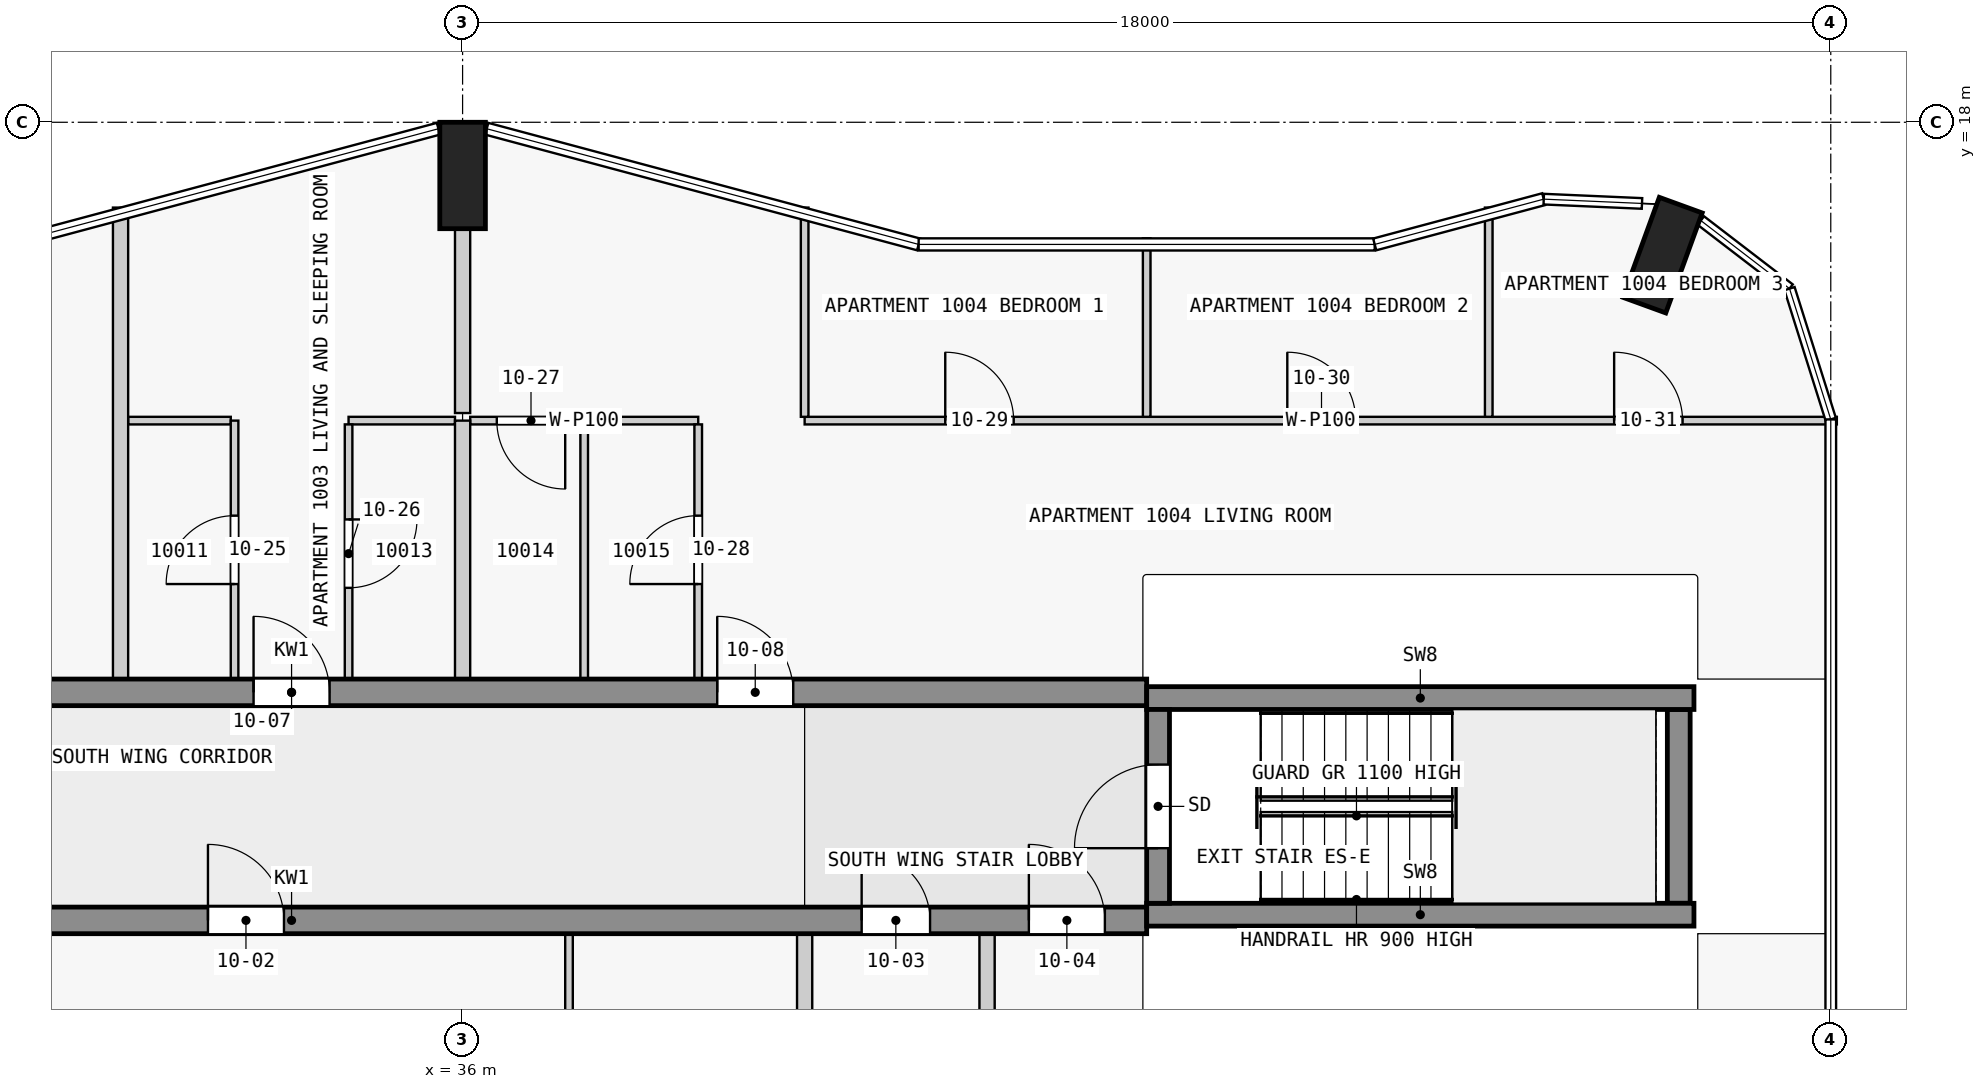
"""IFC4 building model, lengths in metres.
Left out: names, types, materials, properties, quantities, classifications, styles, units other than length and angle.
Written with IfcOpenShell. Run it as: python <this file> out.ifc"""

import sys

from ifc_helpers import new_model, si_unit, direction, frame, frame_2d, origin, origin_2d, place, context, subcontext, project, spatial, rectangle, extrude, element, fill, save


model = new_model("IFC4")
c1 = context("Model", 3, precision=1e-05, world=origin(), true_north=direction((0.0, 1.0)))
c2 = subcontext(c1, "Body", "Model", "MODEL_VIEW")
j1 = project(units=[si_unit("LENGTHUNIT", "METRE"), si_unit("PLANEANGLEUNIT", "RADIAN")], contexts=[c1])
p1 = place(None, origin())
s1 = spatial("IfcSite", under=j1, at=p1, CompositionType="ELEMENT")
p2 = place(p1, origin())
s2 = spatial("IfcBuilding", under=s1, at=p2, CompositionType="ELEMENT")
p3 = place(p2, frame((0.0, 0.0, 44.3)))
s3 = spatial("IfcBuildingStorey", under=s2, at=p3, CompositionType="ELEMENT", Elevation=44.3)
for number, where, z_axis, x_axis in (
    (1, (51.787, 16.252, 0.0), (0.0, 0.0, 1.0), (-0.94, 0.342, 0.0)),
    (2, (36.0, 17.3, 0.0), (0.0, 0.0, 1.0), (1.0, 0.0, 0.0)),
):
    element("IfcColumn", number, at=place(p3, frame(where, z_axis=z_axis, x_axis=x_axis)), inside=s3, PredefinedType="COLUMN", context=c2, shape_type="SweptSolid", body=[
        extrude(rectangle(XDim=0.6, YDim=1.4, at=origin_2d()), origin(), (0.0, 0.0, 1.0), 3.5),
    ])
p4 = place(p3, frame((45.15, 7.725, 0.0), z_axis=(0.0, 0.0, 1.0), x_axis=(0.0, 1.0, 0.0)))
e3 = element("IfcWall", 3, at=p4, inside=s3, PredefinedType="SHEAR", context=c2, shape_type="SweptSolid", body=[
    extrude(rectangle(XDim=2.55, YDim=0.3, at=frame_2d((1.275, 0.0))), origin(), (0.0, 0.0, 1.0), 3.5),
])
p5 = place(p4, frame((0.725, 0.0, 0.0)))
e4 = element("IfcOpeningElement", 4, at=p5, cuts=e3, PredefinedType="OPENING", context=c2, shape_type="SweptSolid", body=[
    extrude(rectangle(XDim=1.1, YDim=2.1, at=frame_2d((0.55, 1.05))), frame((0.0, 0.16, 0.0), z_axis=(0.0, -1.0, 0.0), x_axis=(1.0, 0.0, 0.0)), (0.0, 0.0, 1.0), 0.32),
])
p6 = place(p3, frame((52.0, 7.725, 0.0), z_axis=(0.0, 0.0, 1.0), x_axis=(0.0, 1.0, 0.0)))
e5 = element("IfcWall", 5, at=p6, inside=s3, PredefinedType="SHEAR", context=c2, shape_type="SweptSolid", body=[
    extrude(rectangle(XDim=2.55, YDim=0.3, at=frame_2d((1.275, 0.0))), origin(), (0.0, 0.0, 1.0), 3.5),
])
for number, where, z_axis, x_axis in (
    (6, (45.0, 7.575, 0.0), (0.0, 0.0, 1.0), (1.0, 0.0, 0.0)),
    (7, (45.0, 10.425, 0.0), (0.0, 0.0, 1.0), (1.0, 0.0, 0.0)),
):
    element("IfcWall", number, at=place(p3, frame(where, z_axis=z_axis, x_axis=x_axis)), inside=s3, PredefinedType="SHEAR", context=c2, shape_type="SweptSolid", body=[
        extrude(rectangle(XDim=7.2, YDim=0.3, at=frame_2d((3.6, 0.0))), origin(), (0.0, 0.0, 1.0), 3.5),
    ])
p7 = place(p3, frame((22.5, 7.5, 0.0), z_axis=(0.0, 0.0, 1.0), x_axis=(1.0, 0.0, 0.0)))
e8 = element("IfcWall", 8, at=p7, inside=s3, PredefinedType="SHEAR", context=c2, shape_type="SweptSolid", body=[
    extrude(rectangle(XDim=22.5, YDim=0.35, at=frame_2d((11.25, 0.0))), origin(), (0.0, 0.0, 1.0), 3.25),
])
p8 = place(p7, frame((1.75, 0.0, 0.0)))
e9 = element("IfcOpeningElement", 9, at=p8, cuts=e8, PredefinedType="OPENING", context=c2, shape_type="SweptSolid", body=[
    extrude(rectangle(XDim=1.0, YDim=2.1, at=frame_2d((0.5, 1.05))), frame((0.0, 0.185, 0.0), z_axis=(0.0, -1.0, 0.0), x_axis=(1.0, 0.0, 0.0)), (0.0, 0.0, 1.0), 0.37),
])
p9 = place(p7, frame((10.15, 0.0, 0.0)))
e10 = element("IfcOpeningElement", 10, at=p9, cuts=e8, PredefinedType="OPENING", context=c2, shape_type="SweptSolid", body=[
    extrude(rectangle(XDim=1.0, YDim=2.1, at=frame_2d((0.5, 1.05))), frame((0.0, 0.185, 0.0), z_axis=(0.0, -1.0, 0.0), x_axis=(1.0, 0.0, 0.0)), (0.0, 0.0, 1.0), 0.37),
])
p10 = place(p7, frame((18.75, 0.0, 0.0)))
e11 = element("IfcOpeningElement", 11, at=p10, cuts=e8, PredefinedType="OPENING", context=c2, shape_type="SweptSolid", body=[
    extrude(rectangle(XDim=0.9, YDim=2.1, at=frame_2d((0.45, 1.05))), frame((0.0, 0.185, 0.0), z_axis=(0.0, -1.0, 0.0), x_axis=(1.0, 0.0, 0.0)), (0.0, 0.0, 1.0), 0.37),
])
p11 = place(p7, frame((20.95, 0.0, 0.0)))
e12 = element("IfcOpeningElement", 12, at=p11, cuts=e8, PredefinedType="OPENING", context=c2, shape_type="SweptSolid", body=[
    extrude(rectangle(XDim=1.0, YDim=2.1, at=frame_2d((0.5, 1.05))), frame((0.0, 0.185, 0.0), z_axis=(0.0, -1.0, 0.0), x_axis=(1.0, 0.0, 0.0)), (0.0, 0.0, 1.0), 0.37),
])
p12 = place(p3, frame((22.5, 10.5, 0.0), z_axis=(0.0, 0.0, 1.0), x_axis=(1.0, 0.0, 0.0)))
e13 = element("IfcWall", 13, at=p12, inside=s3, PredefinedType="SHEAR", context=c2, shape_type="SweptSolid", body=[
    extrude(rectangle(XDim=22.5, YDim=0.35, at=frame_2d((11.25, 0.0))), origin(), (0.0, 0.0, 1.0), 3.25),
])
p13 = place(p12, frame((1.75, 0.0, 0.0)))
e14 = element("IfcOpeningElement", 14, at=p13, cuts=e13, PredefinedType="OPENING", context=c2, shape_type="SweptSolid", body=[
    extrude(rectangle(XDim=1.0, YDim=2.1, at=frame_2d((0.5, 1.05))), frame((0.0, 0.185, 0.0), z_axis=(0.0, -1.0, 0.0), x_axis=(1.0, 0.0, 0.0)), (0.0, 0.0, 1.0), 0.37),
])
p14 = place(p12, frame((6.25, 0.0, 0.0)))
e15 = element("IfcOpeningElement", 15, at=p14, cuts=e13, PredefinedType="OPENING", context=c2, shape_type="SweptSolid", body=[
    extrude(rectangle(XDim=1.0, YDim=2.1, at=frame_2d((0.5, 1.05))), frame((0.0, 0.185, 0.0), z_axis=(0.0, -1.0, 0.0), x_axis=(1.0, 0.0, 0.0)), (0.0, 0.0, 1.0), 0.37),
])
p15 = place(p12, frame((10.75, 0.0, 0.0)))
e16 = element("IfcOpeningElement", 16, at=p15, cuts=e13, PredefinedType="OPENING", context=c2, shape_type="SweptSolid", body=[
    extrude(rectangle(XDim=1.0, YDim=2.1, at=frame_2d((0.5, 1.05))), frame((0.0, 0.185, 0.0), z_axis=(0.0, -1.0, 0.0), x_axis=(1.0, 0.0, 0.0)), (0.0, 0.0, 1.0), 0.37),
])
p16 = place(p12, frame((16.85, 0.0, 0.0)))
e17 = element("IfcOpeningElement", 17, at=p16, cuts=e13, PredefinedType="OPENING", context=c2, shape_type="SweptSolid", body=[
    extrude(rectangle(XDim=1.0, YDim=2.1, at=frame_2d((0.5, 1.05))), frame((0.0, 0.185, 0.0), z_axis=(0.0, -1.0, 0.0), x_axis=(1.0, 0.0, 0.0)), (0.0, 0.0, 1.0), 0.37),
])
p17 = place(p3, frame((32.95, 14.075, 0.0), z_axis=(0.0, 0.0, 1.0), x_axis=(-1.0, 0.0, 0.0)))
e18 = element("IfcWall", 18, at=p17, inside=s3, PredefinedType="PARTITIONING", context=c2, shape_type="SweptSolid", body=[
    extrude(rectangle(XDim=1.35, YDim=0.1, at=frame_2d((0.675, 0.0))), origin(), (0.0, 0.0, 1.0), 3.25),
])
p18 = place(p3, frame((35.9, 14.075, 0.0), z_axis=(0.0, 0.0, 1.0), x_axis=(-1.0, 0.0, 0.0)))
e19 = element("IfcWall", 19, at=p18, inside=s3, PredefinedType="PARTITIONING", context=c2, shape_type="SweptSolid", body=[
    extrude(rectangle(XDim=1.4, YDim=0.1, at=frame_2d((0.7, 0.0))), origin(), (0.0, 0.0, 1.0), 3.25),
])
p19 = place(p3, frame((39.1, 14.075, 0.0), z_axis=(0.0, 0.0, 1.0), x_axis=(-1.0, 0.0, 0.0)))
e20 = element("IfcWall", 20, at=p19, inside=s3, PredefinedType="PARTITIONING", context=c2, shape_type="SweptSolid", body=[
    extrude(rectangle(XDim=3.0, YDim=0.1, at=frame_2d((1.5, 0.0))), origin(), (0.0, 0.0, 1.0), 3.25),
])
p20 = place(p19, frame((1.75, 0.0, 0.0)))
e21 = element("IfcOpeningElement", 21, at=p20, cuts=e20, PredefinedType="OPENING", context=c2, shape_type="SweptSolid", body=[
    extrude(rectangle(XDim=0.9, YDim=2.1, at=frame_2d((0.45, 1.05))), frame((0.0, 0.06, 0.0), z_axis=(0.0, -1.0, 0.0), x_axis=(1.0, 0.0, 0.0)), (0.0, 0.0, 1.0), 0.12),
])
p21 = place(p3, frame((40.5, 14.075, 0.0), z_axis=(0.0, 0.0, 1.0), x_axis=(1.0, 0.0, 0.0)))
e22 = element("IfcWall", 22, at=p21, inside=s3, PredefinedType="PARTITIONING", context=c2, shape_type="SweptSolid", body=[
    extrude(rectangle(XDim=13.58, YDim=0.1, at=frame_2d((6.79, 0.0))), origin(), (0.0, 0.0, 1.0), 3.25),
])
p22 = place(p21, frame((1.85, 0.0, 0.0)))
e23 = element("IfcOpeningElement", 23, at=p22, cuts=e22, PredefinedType="OPENING", context=c2, shape_type="SweptSolid", body=[
    extrude(rectangle(XDim=0.9, YDim=2.1, at=frame_2d((0.45, 1.05))), frame((0.0, 0.06, 0.0), z_axis=(0.0, -1.0, 0.0), x_axis=(1.0, 0.0, 0.0)), (0.0, 0.0, 1.0), 0.12),
])
p23 = place(p21, frame((6.35, 0.0, 0.0)))
e24 = element("IfcOpeningElement", 24, at=p23, cuts=e22, PredefinedType="OPENING", context=c2, shape_type="SweptSolid", body=[
    extrude(rectangle(XDim=0.9, YDim=2.1, at=frame_2d((0.45, 1.05))), frame((0.0, 0.06, 0.0), z_axis=(0.0, -1.0, 0.0), x_axis=(1.0, 0.0, 0.0)), (0.0, 0.0, 1.0), 0.12),
])
p24 = place(p21, frame((10.65, 0.0, 0.0)))
e25 = element("IfcOpeningElement", 25, at=p24, cuts=e22, PredefinedType="OPENING", context=c2, shape_type="SweptSolid", body=[
    extrude(rectangle(XDim=0.9, YDim=2.1, at=frame_2d((0.45, 1.05))), frame((0.0, 0.06, 0.0), z_axis=(0.0, -1.0, 0.0), x_axis=(1.0, 0.0, 0.0)), (0.0, 0.0, 1.0), 0.12),
])
p25 = place(p3, frame((31.5, 10.675, 0.0), z_axis=(0.0, 0.0, 1.0), x_axis=(0.0, 1.0, 0.0)))
e26 = element("IfcWall", 26, at=p25, inside=s3, PredefinedType="PARTITIONING", context=c2, shape_type="SweptSolid", body=[
    extrude(rectangle(XDim=6.203, YDim=0.2, at=frame_2d((3.101, 0.0))), origin(), (0.0, 0.0, 1.0), 3.25),
])
p26 = place(p3, frame((33.0, 10.675, 0.0), z_axis=(0.0, 0.0, 1.0), x_axis=(0.0, 1.0, 0.0)))
e27 = element("IfcWall", 27, at=p26, inside=s3, PredefinedType="PARTITIONING", context=c2, shape_type="SweptSolid", body=[
    extrude(rectangle(XDim=3.4, YDim=0.1, at=frame_2d((1.7, 0.0))), origin(), (0.0, 0.0, 1.0), 3.25),
])
p27 = place(p26, frame((1.25, 0.0, 0.0)))
e28 = element("IfcOpeningElement", 28, at=p27, cuts=e27, PredefinedType="OPENING", context=c2, shape_type="SweptSolid", body=[
    extrude(rectangle(XDim=0.9, YDim=2.1, at=frame_2d((0.45, 1.05))), frame((0.0, 0.06, 0.0), z_axis=(0.0, -1.0, 0.0), x_axis=(1.0, 0.0, 0.0)), (0.0, 0.0, 1.0), 0.12),
])
p28 = place(p3, frame((34.5, 14.025, 0.0), z_axis=(0.0, 0.0, 1.0), x_axis=(0.0, -1.0, 0.0)))
e29 = element("IfcWall", 29, at=p28, inside=s3, PredefinedType="PARTITIONING", context=c2, shape_type="SweptSolid", body=[
    extrude(rectangle(XDim=3.35, YDim=0.1, at=frame_2d((1.675, 0.0))), origin(), (0.0, 0.0, 1.0), 3.25),
])
p29 = place(p28, frame((1.25, 0.0, 0.0)))
e30 = element("IfcOpeningElement", 30, at=p29, cuts=e29, PredefinedType="OPENING", context=c2, shape_type="SweptSolid", body=[
    extrude(rectangle(XDim=0.9, YDim=2.1, at=frame_2d((0.45, 1.05))), frame((0.0, 0.06, 0.0), z_axis=(0.0, -1.0, 0.0), x_axis=(1.0, 0.0, 0.0)), (0.0, 0.0, 1.0), 0.12),
])
p30 = place(p3, frame((36.0, 16.6, 0.0), z_axis=(0.0, 0.0, 1.0), x_axis=(0.0, -1.0, 0.0)))
e31 = element("IfcWall", 31, at=p30, inside=s3, PredefinedType="PARTITIONING", context=c2, shape_type="SweptSolid", body=[
    extrude(rectangle(XDim=2.425, YDim=0.2, at=frame_2d((1.212, 0.0))), origin(), (0.0, 0.0, 1.0), 3.25),
])
p31 = place(p3, frame((36.0, 10.675, 0.0), z_axis=(0.0, 0.0, 1.0), x_axis=(0.0, 1.0, 0.0)))
e32 = element("IfcWall", 32, at=p31, inside=s3, PredefinedType="PARTITIONING", context=c2, shape_type="SweptSolid", body=[
    extrude(rectangle(XDim=3.4, YDim=0.2, at=frame_2d((1.7, 0.0))), origin(), (0.0, 0.0, 1.0), 3.25),
])
p32 = place(p3, frame((37.4, 7.325, 0.0), z_axis=(0.0, 0.0, 1.0), x_axis=(0.0, -1.0, 0.0)))
e33 = element("IfcWall", 33, at=p32, inside=s3, PredefinedType="PARTITIONING", context=c2, shape_type="SweptSolid", body=[
    extrude(rectangle(XDim=3.4, YDim=0.1, at=frame_2d((1.7, 0.0))), origin(), (0.0, 0.0, 1.0), 3.25),
])
p33 = place(p32, frame((1.25, 0.0, 0.0)))
e34 = element("IfcOpeningElement", 34, at=p33, cuts=e33, PredefinedType="OPENING", context=c2, shape_type="SweptSolid", body=[
    extrude(rectangle(XDim=0.9, YDim=2.1, at=frame_2d((0.45, 1.05))), frame((0.0, 0.06, 0.0), z_axis=(0.0, -1.0, 0.0), x_axis=(1.0, 0.0, 0.0)), (0.0, 0.0, 1.0), 0.12),
])
p34 = place(p3, frame((37.6, 10.675, 0.0), z_axis=(0.0, 0.0, 1.0), x_axis=(0.0, 1.0, 0.0)))
e35 = element("IfcWall", 35, at=p34, inside=s3, PredefinedType="PARTITIONING", context=c2, shape_type="SweptSolid", body=[
    extrude(rectangle(XDim=3.35, YDim=0.1, at=frame_2d((1.675, 0.0))), origin(), (0.0, 0.0, 1.0), 3.25),
])
p35 = place(p3, frame((39.1, 10.675, 0.0), z_axis=(0.0, 0.0, 1.0), x_axis=(0.0, 1.0, 0.0)))
e36 = element("IfcWall", 36, at=p35, inside=s3, PredefinedType="PARTITIONING", context=c2, shape_type="SweptSolid", body=[
    extrude(rectangle(XDim=3.35, YDim=0.1, at=frame_2d((1.675, 0.0))), origin(), (0.0, 0.0, 1.0), 3.25),
])
p36 = place(p35, frame((1.25, 0.0, 0.0)))
e37 = element("IfcOpeningElement", 37, at=p36, cuts=e36, PredefinedType="OPENING", context=c2, shape_type="SweptSolid", body=[
    extrude(rectangle(XDim=0.9, YDim=2.1, at=frame_2d((0.45, 1.05))), frame((0.0, 0.06, 0.0), z_axis=(0.0, -1.0, 0.0), x_axis=(1.0, 0.0, 0.0)), (0.0, 0.0, 1.0), 0.12),
])
p37 = place(p3, frame((40.5, 16.878, 0.0), z_axis=(0.0, 0.0, 1.0), x_axis=(0.0, -1.0, 0.0)))
e38 = element("IfcWall", 38, at=p37, inside=s3, PredefinedType="PARTITIONING", context=c2, shape_type="SweptSolid", body=[
    extrude(rectangle(XDim=2.753, YDim=0.1, at=frame_2d((1.376, 0.0))), origin(), (0.0, 0.0, 1.0), 3.25),
])
p38 = place(p3, frame((40.5, 1.122, 0.0), z_axis=(0.0, 0.0, 1.0), x_axis=(0.0, 1.0, 0.0)))
e39 = element("IfcWall", 39, at=p38, inside=s3, PredefinedType="PARTITIONING", context=c2, shape_type="SweptSolid", body=[
    extrude(rectangle(XDim=6.203, YDim=0.2, at=frame_2d((3.101, 0.0))), origin(), (0.0, 0.0, 1.0), 3.25),
])
p39 = place(p3, frame((42.9, 3.925, 0.0), z_axis=(0.0, 0.0, 1.0), x_axis=(0.0, 1.0, 0.0)))
e40 = element("IfcWall", 40, at=p39, inside=s3, PredefinedType="PARTITIONING", context=c2, shape_type="SweptSolid", body=[
    extrude(rectangle(XDim=3.4, YDim=0.2, at=frame_2d((1.7, 0.0))), origin(), (0.0, 0.0, 1.0), 3.25),
])
p40 = place(p3, frame((45.0, 14.125, 0.0), z_axis=(0.0, 0.0, 1.0), x_axis=(0.0, 1.0, 0.0)))
e41 = element("IfcWall", 41, at=p40, inside=s3, PredefinedType="PARTITIONING", context=c2, shape_type="SweptSolid", body=[
    extrude(rectangle(XDim=2.348, YDim=0.1, at=frame_2d((1.174, 0.0))), origin(), (0.0, 0.0, 1.0), 3.25),
])
p41 = place(p3, frame((49.5, 14.125, 0.0), z_axis=(0.0, 0.0, 1.0), x_axis=(0.0, 1.0, 0.0)))
e42 = element("IfcWall", 42, at=p41, inside=s3, PredefinedType="PARTITIONING", context=c2, shape_type="SweptSolid", body=[
    extrude(rectangle(XDim=2.753, YDim=0.1, at=frame_2d((1.376, 0.0))), origin(), (0.0, 0.0, 1.0), 3.25),
])
p42 = place(p5, origin())
e43 = element("IfcDoor", 43, at=p42, inside=s3, OperationType="SINGLE_SWING_LEFT", PredefinedType="DOOR", context=c2, shape_type="SweptSolid", body=[
    extrude(rectangle(XDim=1.1, YDim=2.1, at=frame_2d((0.55, 1.05))), frame((0.0, 0.025, 0.0), z_axis=(0.0, -1.0, 0.0), x_axis=(1.0, 0.0, 0.0)), (0.0, 0.0, 1.0), 0.05),
])
fill(e4, e43)
p43 = place(p9, origin())
e44 = element("IfcDoor", 44, at=p43, inside=s3, OperationType="SINGLE_SWING_LEFT", PredefinedType="DOOR", context=c2, shape_type="SweptSolid", body=[
    extrude(rectangle(XDim=1.0, YDim=2.1, at=frame_2d((0.5, 1.05))), frame((0.0, 0.025, 0.0), z_axis=(0.0, -1.0, 0.0), x_axis=(1.0, 0.0, 0.0)), (0.0, 0.0, 1.0), 0.05),
])
fill(e10, e44)
p44 = place(p10, origin())
e45 = element("IfcDoor", 45, at=p44, inside=s3, OperationType="SINGLE_SWING_RIGHT", PredefinedType="DOOR", context=c2, shape_type="SweptSolid", body=[
    extrude(rectangle(XDim=0.9, YDim=2.1, at=frame_2d((0.45, 1.05))), frame((0.0, 0.025, 0.0), z_axis=(0.0, -1.0, 0.0), x_axis=(1.0, 0.0, 0.0)), (0.0, 0.0, 1.0), 0.05),
])
fill(e11, e45)
p45 = place(p11, origin())
e46 = element("IfcDoor", 46, at=p45, inside=s3, OperationType="SINGLE_SWING_RIGHT", PredefinedType="DOOR", context=c2, shape_type="SweptSolid", body=[
    extrude(rectangle(XDim=1.0, YDim=2.1, at=frame_2d((0.5, 1.05))), frame((0.0, 0.025, 0.0), z_axis=(0.0, -1.0, 0.0), x_axis=(1.0, 0.0, 0.0)), (0.0, 0.0, 1.0), 0.05),
])
fill(e12, e46)
p46 = place(p15, origin())
e47 = element("IfcDoor", 47, at=p46, inside=s3, OperationType="SINGLE_SWING_LEFT", PredefinedType="DOOR", context=c2, shape_type="SweptSolid", body=[
    extrude(rectangle(XDim=1.0, YDim=2.1, at=frame_2d((0.5, 1.05))), frame((0.0, 0.025, 0.0), z_axis=(0.0, -1.0, 0.0), x_axis=(1.0, 0.0, 0.0)), (0.0, 0.0, 1.0), 0.05),
])
fill(e16, e47)
p47 = place(p16, origin())
e48 = element("IfcDoor", 48, at=p47, inside=s3, OperationType="SINGLE_SWING_RIGHT", PredefinedType="DOOR", context=c2, shape_type="SweptSolid", body=[
    extrude(rectangle(XDim=1.0, YDim=2.1, at=frame_2d((0.5, 1.05))), frame((0.0, 0.025, 0.0), z_axis=(0.0, -1.0, 0.0), x_axis=(1.0, 0.0, 0.0)), (0.0, 0.0, 1.0), 0.05),
])
fill(e17, e48)
p48 = place(p27, origin())
e49 = element("IfcDoor", 49, at=p48, inside=s3, OperationType="SINGLE_SWING_RIGHT", PredefinedType="DOOR", context=c2, shape_type="SweptSolid", body=[
    extrude(rectangle(XDim=0.9, YDim=2.1, at=frame_2d((0.45, 1.05))), frame((0.0, 0.025, 0.0), z_axis=(0.0, -1.0, 0.0), x_axis=(1.0, 0.0, 0.0)), (0.0, 0.0, 1.0), 0.05),
])
fill(e28, e49)
p49 = place(p29, origin())
e50 = element("IfcDoor", 50, at=p49, inside=s3, OperationType="SINGLE_SWING_RIGHT", PredefinedType="DOOR", context=c2, shape_type="SweptSolid", body=[
    extrude(rectangle(XDim=0.9, YDim=2.1, at=frame_2d((0.45, 1.05))), frame((0.0, 0.025, 0.0), z_axis=(0.0, -1.0, 0.0), x_axis=(1.0, 0.0, 0.0)), (0.0, 0.0, 1.0), 0.05),
])
fill(e30, e50)
p50 = place(p20, origin())
e51 = element("IfcDoor", 51, at=p50, inside=s3, OperationType="SINGLE_SWING_RIGHT", PredefinedType="DOOR", context=c2, shape_type="SweptSolid", body=[
    extrude(rectangle(XDim=0.9, YDim=2.1, at=frame_2d((0.45, 1.05))), frame((0.0, 0.025, 0.0), z_axis=(0.0, -1.0, 0.0), x_axis=(1.0, 0.0, 0.0)), (0.0, 0.0, 1.0), 0.05),
])
fill(e21, e51)
p51 = place(p36, origin())
e52 = element("IfcDoor", 52, at=p51, inside=s3, OperationType="SINGLE_SWING_RIGHT", PredefinedType="DOOR", context=c2, shape_type="SweptSolid", body=[
    extrude(rectangle(XDim=0.9, YDim=2.1, at=frame_2d((0.45, 1.05))), frame((0.0, 0.025, 0.0), z_axis=(0.0, -1.0, 0.0), x_axis=(1.0, 0.0, 0.0)), (0.0, 0.0, 1.0), 0.05),
])
fill(e37, e52)
p52 = place(p22, origin())
e53 = element("IfcDoor", 53, at=p52, inside=s3, OperationType="SINGLE_SWING_LEFT", PredefinedType="DOOR", context=c2, shape_type="SweptSolid", body=[
    extrude(rectangle(XDim=0.9, YDim=2.1, at=frame_2d((0.45, 1.05))), frame((0.0, 0.025, 0.0), z_axis=(0.0, -1.0, 0.0), x_axis=(1.0, 0.0, 0.0)), (0.0, 0.0, 1.0), 0.05),
])
fill(e23, e53)
p53 = place(p23, origin())
e54 = element("IfcDoor", 54, at=p53, inside=s3, OperationType="SINGLE_SWING_RIGHT", PredefinedType="DOOR", context=c2, shape_type="SweptSolid", body=[
    extrude(rectangle(XDim=0.9, YDim=2.1, at=frame_2d((0.45, 1.05))), frame((0.0, 0.025, 0.0), z_axis=(0.0, -1.0, 0.0), x_axis=(1.0, 0.0, 0.0)), (0.0, 0.0, 1.0), 0.05),
])
fill(e24, e54)
p54 = place(p24, origin())
e55 = element("IfcDoor", 55, at=p54, inside=s3, OperationType="SINGLE_SWING_RIGHT", PredefinedType="DOOR", context=c2, shape_type="SweptSolid", body=[
    extrude(rectangle(XDim=0.9, YDim=2.1, at=frame_2d((0.45, 1.05))), frame((0.0, 0.025, 0.0), z_axis=(0.0, -1.0, 0.0), x_axis=(1.0, 0.0, 0.0)), (0.0, 0.0, 1.0), 0.05),
])
fill(e25, e55)
save(model, sys.argv[1])
